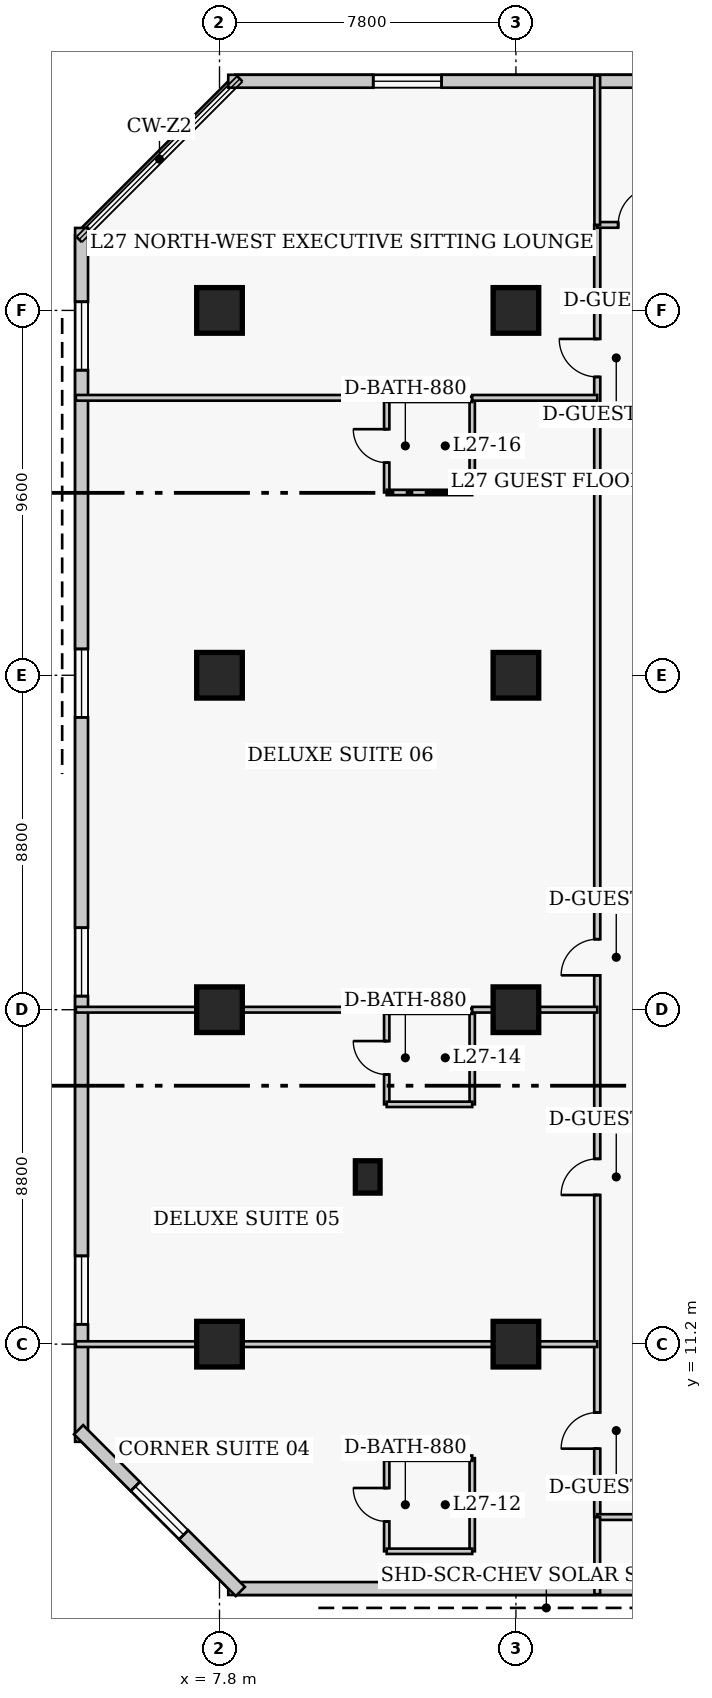
"""IFC4 building model, lengths in metres.
Left out: names, types, materials, properties, quantities, classifications, styles, units other than length and angle.
Written with IfcOpenShell. Run it as: python <this file> out.ifc"""

import sys

from ifc_helpers import new_model, si_unit, direction, frame, frame_2d, origin, origin_2d, place, context, subcontext, project, spatial, rectangle, extrude, element, fill, save


model = new_model("IFC4")
c1 = context("Model", 3, precision=1e-05, world=origin(), true_north=direction((0.0, 1.0)))
c2 = subcontext(c1, "Body", "Model", "MODEL_VIEW")
j1 = project(units=[si_unit("LENGTHUNIT", "METRE"), si_unit("PLANEANGLEUNIT", "RADIAN")], contexts=[c1])
p1 = place(None, origin())
s1 = spatial("IfcSite", under=j1, at=p1, CompositionType="ELEMENT")
p2 = place(p1, origin())
s2 = spatial("IfcBuilding", under=s1, at=p2, CompositionType="ELEMENT")
p3 = place(p2, frame((0.0, 0.0, 110.8)))
s3 = spatial("IfcBuildingStorey", under=s2, at=p3, CompositionType="ELEMENT", Elevation=110.8)
for number, where, z_axis, x_axis in (
    (1, (7.8, 11.2, 0.0), (0.0, 0.0, 1.0), (1.0, 0.0, 0.0)),
    (2, (7.8, 20.0, 0.0), (0.0, 0.0, 1.0), (1.0, 0.0, 0.0)),
    (3, (7.8, 28.8, 0.0), (0.0, 0.0, 1.0), (1.0, 0.0, 0.0)),
    (4, (7.8, 38.4, 0.0), (0.0, 0.0, 1.0), (1.0, 0.0, 0.0)),
    (5, (15.6, 11.2, 0.0), (0.0, 0.0, 1.0), (1.0, 0.0, 0.0)),
    (6, (15.6, 20.0, 0.0), (0.0, 0.0, 1.0), (1.0, 0.0, 0.0)),
    (7, (15.6, 28.8, 0.0), (0.0, 0.0, 1.0), (1.0, 0.0, 0.0)),
    (8, (15.6, 38.4, 0.0), (0.0, 0.0, 1.0), (1.0, 0.0, 0.0)),
):
    element("IfcColumn", number, at=place(p3, frame(where, z_axis=z_axis, x_axis=x_axis)), inside=s3, PredefinedType="COLUMN", context=c2, shape_type="SweptSolid", body=[
        extrude(rectangle(XDim=1.2, YDim=1.2, at=origin_2d()), origin(), (0.0, 0.0, 1.0), 3.8),
    ])
p4 = place(p3, frame((11.7, 15.6, 0.0), z_axis=(0.0, 0.0, 1.0), x_axis=(1.0, 0.0, 0.0)))
e9 = element("IfcColumn", 9, at=p4, inside=s3, PredefinedType="PILASTER", context=c2, shape_type="SweptSolid", body=[
    extrude(rectangle(XDim=0.65, YDim=0.85, at=origin_2d()), origin(), (0.0, 0.0, 1.0), 3.8),
])
p5 = place(p3, frame((8.03, 4.77, 0.0), z_axis=(0.0, 0.0, 1.0), x_axis=(1.0, 0.0, 0.0)))
e10 = element("IfcWall", 10, at=p5, inside=s3, PredefinedType="SOLIDWALL", context=c2, shape_type="SweptSolid", body=[
    extrude(rectangle(XDim=28.29, YDim=0.34, at=frame_2d((14.145, 0.0))), origin(), (0.0, 0.0, 1.0), 3.54),
])
p6 = place(p5, frame((12.595, 0.0, 0.85)))
e11 = element("IfcOpeningElement", 11, at=p6, cuts=e10, PredefinedType="OPENING", context=c2, shape_type="SweptSolid", body=[
    extrude(rectangle(XDim=1.8, YDim=1.8, at=frame_2d((0.9, 0.9))), frame((0.0, 0.18, 0.0), z_axis=(0.0, -1.0, 0.0), x_axis=(1.0, 0.0, 0.0)), (0.0, 0.0, 1.0), 0.36),
])
p7 = place(p3, frame((36.32, 44.43, 0.0), z_axis=(0.0, 0.0, 1.0), x_axis=(-1.0, 0.0, 0.0)))
e12 = element("IfcWall", 12, at=p7, inside=s3, PredefinedType="SOLIDWALL", context=c2, shape_type="SweptSolid", body=[
    extrude(rectangle(XDim=28.29, YDim=0.34, at=frame_2d((14.145, 0.0))), origin(), (0.0, 0.0, 1.0), 3.54),
])
p8 = place(p7, frame((3.815, 0.0, 0.85)))
e13 = element("IfcOpeningElement", 13, at=p8, cuts=e12, PredefinedType="OPENING", context=c2, shape_type="SweptSolid", body=[
    extrude(rectangle(XDim=1.8, YDim=1.8, at=frame_2d((0.9, 0.9))), frame((0.0, 0.18, 0.0), z_axis=(0.0, -1.0, 0.0), x_axis=(1.0, 0.0, 0.0)), (0.0, 0.0, 1.0), 0.36),
])
p9 = place(p7, frame((13.245, 0.0, 0.85)))
e14 = element("IfcOpeningElement", 14, at=p9, cuts=e12, PredefinedType="OPENING", context=c2, shape_type="SweptSolid", body=[
    extrude(rectangle(XDim=1.8, YDim=1.8, at=frame_2d((0.9, 0.9))), frame((0.0, 0.18, 0.0), z_axis=(0.0, -1.0, 0.0), x_axis=(1.0, 0.0, 0.0)), (0.0, 0.0, 1.0), 0.36),
])
p10 = place(p7, frame((22.675, 0.0, 0.85)))
e15 = element("IfcOpeningElement", 15, at=p10, cuts=e12, PredefinedType="OPENING", context=c2, shape_type="SweptSolid", body=[
    extrude(rectangle(XDim=1.8, YDim=1.8, at=frame_2d((0.9, 0.9))), frame((0.0, 0.18, 0.0), z_axis=(0.0, -1.0, 0.0), x_axis=(1.0, 0.0, 0.0)), (0.0, 0.0, 1.0), 0.36),
])
p11 = place(p3, frame((4.17, 40.57, 0.0), z_axis=(0.0, 0.0, 1.0), x_axis=(0.0, -1.0, 0.0)))
e16 = element("IfcWall", 16, at=p11, inside=s3, PredefinedType="SOLIDWALL", context=c2, shape_type="SweptSolid", body=[
    extrude(rectangle(XDim=31.94, YDim=0.34, at=frame_2d((15.97, 0.0))), origin(), (0.0, 0.0, 1.0), 3.54),
])
p12 = place(p11, frame((1.942, 0.0, 0.85)))
e17 = element("IfcOpeningElement", 17, at=p12, cuts=e16, PredefinedType="OPENING", context=c2, shape_type="SweptSolid", body=[
    extrude(rectangle(XDim=1.8, YDim=1.8, at=frame_2d((0.9, 0.9))), frame((0.0, 0.18, 0.0), z_axis=(0.0, -1.0, 0.0), x_axis=(1.0, 0.0, 0.0)), (0.0, 0.0, 1.0), 0.36),
])
p13 = place(p11, frame((11.077, 0.0, 0.85)))
e18 = element("IfcOpeningElement", 18, at=p13, cuts=e16, PredefinedType="OPENING", context=c2, shape_type="SweptSolid", body=[
    extrude(rectangle(XDim=1.8, YDim=1.8, at=frame_2d((0.9, 0.9))), frame((0.0, 0.18, 0.0), z_axis=(0.0, -1.0, 0.0), x_axis=(1.0, 0.0, 0.0)), (0.0, 0.0, 1.0), 0.36),
])
p14 = place(p11, frame((18.413, 0.0, 0.85)))
e19 = element("IfcOpeningElement", 19, at=p14, cuts=e16, PredefinedType="OPENING", context=c2, shape_type="SweptSolid", body=[
    extrude(rectangle(XDim=1.8, YDim=1.8, at=frame_2d((0.9, 0.9))), frame((0.0, 0.18, 0.0), z_axis=(0.0, -1.0, 0.0), x_axis=(1.0, 0.0, 0.0)), (0.0, 0.0, 1.0), 0.36),
])
p15 = place(p11, frame((27.048, 0.0, 0.85)))
e20 = element("IfcOpeningElement", 20, at=p15, cuts=e16, PredefinedType="OPENING", context=c2, shape_type="SweptSolid", body=[
    extrude(rectangle(XDim=1.8, YDim=1.8, at=frame_2d((0.9, 0.9))), frame((0.0, 0.18, 0.0), z_axis=(0.0, -1.0, 0.0), x_axis=(1.0, 0.0, 0.0)), (0.0, 0.0, 1.0), 0.36),
])
p16 = place(p3, frame((4.092, 8.948, 0.0), z_axis=(0.0, 0.0, 1.0), x_axis=(0.707106781187, -0.707106781187, 0.0)))
e21 = element("IfcWall", 21, at=p16, inside=s3, PredefinedType="SOLIDWALL", context=c2, shape_type="SweptSolid", body=[
    extrude(rectangle(XDim=6.02, YDim=0.34, at=frame_2d((3.01, 0.0))), origin(), (0.0, 0.0, 1.0), 3.54),
])
p17 = place(p16, frame((2.11, 0.0, 0.85)))
e22 = element("IfcOpeningElement", 22, at=p17, cuts=e21, PredefinedType="OPENING", context=c2, shape_type="SweptSolid", body=[
    extrude(rectangle(XDim=1.8, YDim=1.8, at=frame_2d((0.9, 0.9))), frame((0.0, 0.18, 0.0), z_axis=(0.0, -1.0, 0.0), x_axis=(1.0, 0.0, 0.0)), (0.0, 0.0, 1.0), 0.36),
])
p18 = place(p3, frame((17.74, 6.65, 0.0), z_axis=(0.0, 0.0, 1.0), x_axis=(0.0, 1.0, 0.0)))
e23 = element("IfcWall", 23, at=p18, inside=s3, PredefinedType="PARTITIONING", context=c2, shape_type="SweptSolid", body=[
    extrude(rectangle(XDim=34.0, YDim=0.16, at=frame_2d((17.0, 0.0))), origin(), (0.0, 0.0, 1.0), 3.54),
])
p19 = place(p18, frame((1.8, 0.0, 0.0)))
e24 = element("IfcOpeningElement", 24, at=p19, cuts=e23, PredefinedType="OPENING", context=c2, shape_type="SweptSolid", body=[
    extrude(rectangle(XDim=0.95, YDim=2.1, at=frame_2d((0.475, 1.05))), frame((0.0, 0.09, 0.0), z_axis=(0.0, -1.0, 0.0), x_axis=(1.0, 0.0, 0.0)), (0.0, 0.0, 1.0), 0.18),
])
p20 = place(p18, frame((8.475, 0.0, 0.0)))
e25 = element("IfcOpeningElement", 25, at=p20, cuts=e23, PredefinedType="OPENING", context=c2, shape_type="SweptSolid", body=[
    extrude(rectangle(XDim=0.95, YDim=2.1, at=frame_2d((0.475, 1.05))), frame((0.0, 0.09, 0.0), z_axis=(0.0, -1.0, 0.0), x_axis=(1.0, 0.0, 0.0)), (0.0, 0.0, 1.0), 0.18),
])
p21 = place(p18, frame((14.255, 0.0, 0.0)))
e26 = element("IfcOpeningElement", 26, at=p21, cuts=e23, PredefinedType="OPENING", context=c2, shape_type="SweptSolid", body=[
    extrude(rectangle(XDim=0.95, YDim=2.1, at=frame_2d((0.475, 1.05))), frame((0.0, 0.09, 0.0), z_axis=(0.0, -1.0, 0.0), x_axis=(1.0, 0.0, 0.0)), (0.0, 0.0, 1.0), 0.18),
])
p22 = place(p18, frame((30.0, 0.0, 0.0)))
e27 = element("IfcOpeningElement", 27, at=p22, cuts=e23, PredefinedType="OPENING", context=c2, shape_type="SweptSolid", body=[
    extrude(rectangle(XDim=1.0, YDim=2.15, at=frame_2d((0.5, 1.075))), frame((0.0, 0.09, 0.0), z_axis=(0.0, -1.0, 0.0), x_axis=(1.0, 0.0, 0.0)), (0.0, 0.0, 1.0), 0.18),
])
p23 = place(p3, frame((17.74, 6.65, 0.0), z_axis=(0.0, 0.0, 1.0), x_axis=(1.0, 0.0, 0.0)))
e28 = element("IfcWall", 28, at=p23, inside=s3, PredefinedType="PARTITIONING", context=c2, shape_type="SweptSolid", body=[
    extrude(rectangle(XDim=2.22, YDim=0.15, at=frame_2d((1.11, 0.0))), origin(), (0.0, 0.0, 1.0), 3.54),
])
p24 = place(p3, frame((17.74, 40.65, 0.0), z_axis=(0.0, 0.0, 1.0), x_axis=(1.0, 0.0, 0.0)))
e29 = element("IfcWall", 29, at=p24, inside=s3, PredefinedType="PARTITIONING", context=c2, shape_type="SweptSolid", body=[
    extrude(rectangle(XDim=4.36, YDim=0.15, at=frame_2d((2.18, 0.0))), origin(), (0.0, 0.0, 1.0), 3.54),
])
p25 = place(p24, frame((0.55, 0.0, 0.0)))
e30 = element("IfcOpeningElement", 30, at=p25, cuts=e29, PredefinedType="OPENING", context=c2, shape_type="SweptSolid", body=[
    extrude(rectangle(XDim=1.0, YDim=2.15, at=frame_2d((0.5, 1.075))), frame((0.0, 0.085, 0.0), z_axis=(0.0, -1.0, 0.0), x_axis=(1.0, 0.0, 0.0)), (0.0, 0.0, 1.0), 0.17),
])
p26 = place(p3, frame((17.74, 40.65, 0.0), z_axis=(0.0, 0.0, 1.0), x_axis=(0.0, 1.0, 0.0)))
e31 = element("IfcWall", 31, at=p26, inside=s3, PredefinedType="PARTITIONING", context=c2, shape_type="SweptSolid", body=[
    extrude(rectangle(XDim=3.93, YDim=0.15, at=frame_2d((1.965, 0.0))), origin(), (0.0, 0.0, 1.0), 3.54),
])
p27 = place(p3, frame((17.74, 4.62, 0.0), z_axis=(0.0, 0.0, 1.0), x_axis=(0.0, 1.0, 0.0)))
e32 = element("IfcWall", 32, at=p27, inside=s3, PredefinedType="PARTITIONING", context=c2, shape_type="SweptSolid", body=[
    extrude(rectangle(XDim=2.03, YDim=0.15, at=frame_2d((1.015, 0.0))), origin(), (0.0, 0.0, 1.0), 3.54),
])
p28 = place(p3, frame((12.2, 5.75, 0.0), z_axis=(0.0, 0.0, 1.0), x_axis=(0.0, 1.0, 0.0)))
e33 = element("IfcWall", 33, at=p28, inside=s3, PredefinedType="PLUMBINGWALL", context=c2, shape_type="SweptSolid", body=[
    extrude(rectangle(XDim=2.45, YDim=0.14, at=frame_2d((1.225, 0.0))), origin(), (0.0, 0.0, 1.0), 3.54),
])
p29 = place(p28, frame((0.785, 0.0, 0.0)))
e34 = element("IfcOpeningElement", 34, at=p29, cuts=e33, PredefinedType="OPENING", context=c2, shape_type="SweptSolid", body=[
    extrude(rectangle(XDim=0.88, YDim=2.05, at=frame_2d((0.44, 1.025))), frame((0.0, 0.08, 0.0), z_axis=(0.0, -1.0, 0.0), x_axis=(1.0, 0.0, 0.0)), (0.0, 0.0, 1.0), 0.16),
])
p30 = place(p3, frame((14.45, 5.75, 0.0), z_axis=(0.0, 0.0, 1.0), x_axis=(0.0, 1.0, 0.0)))
e35 = element("IfcWall", 35, at=p30, inside=s3, PredefinedType="PLUMBINGWALL", context=c2, shape_type="SweptSolid", body=[
    extrude(rectangle(XDim=2.45, YDim=0.14, at=frame_2d((1.225, 0.0))), origin(), (0.0, 0.0, 1.0), 3.54),
])
for number, where, z_axis, x_axis in (
    (36, (12.2, 5.75, 0.0), (0.0, 0.0, 1.0), (1.0, 0.0, 0.0)),
    (37, (12.2, 8.2, 0.0), (0.0, 0.0, 1.0), (1.0, 0.0, 0.0)),
):
    element("IfcWall", number, at=place(p3, frame(where, z_axis=z_axis, x_axis=x_axis)), inside=s3, PredefinedType="PLUMBINGWALL", context=c2, shape_type="SweptSolid", body=[
        extrude(rectangle(XDim=2.25, YDim=0.14, at=frame_2d((1.125, 0.0))), origin(), (0.0, 0.0, 1.0), 3.54),
    ])
p31 = place(p3, frame((4.02, 11.2, 0.0), z_axis=(0.0, 0.0, 1.0), x_axis=(1.0, 0.0, 0.0)))
e38 = element("IfcWall", 38, at=p31, inside=s3, PredefinedType="PARTITIONING", context=c2, shape_type="SweptSolid", body=[
    extrude(rectangle(XDim=13.72, YDim=0.15, at=frame_2d((6.86, 0.0))), origin(), (0.0, 0.0, 1.0), 2.679),
])
p32 = place(p3, frame((12.2, 17.51, 0.0), z_axis=(0.0, 0.0, 1.0), x_axis=(0.0, 1.0, 0.0)))
e39 = element("IfcWall", 39, at=p32, inside=s3, PredefinedType="PLUMBINGWALL", context=c2, shape_type="SweptSolid", body=[
    extrude(rectangle(XDim=2.45, YDim=0.14, at=frame_2d((1.225, 0.0))), origin(), (0.0, 0.0, 1.0), 3.54),
])
p33 = place(p32, frame((0.785, 0.0, 0.0)))
e40 = element("IfcOpeningElement", 40, at=p33, cuts=e39, PredefinedType="OPENING", context=c2, shape_type="SweptSolid", body=[
    extrude(rectangle(XDim=0.88, YDim=2.05, at=frame_2d((0.44, 1.025))), frame((0.0, 0.08, 0.0), z_axis=(0.0, -1.0, 0.0), x_axis=(1.0, 0.0, 0.0)), (0.0, 0.0, 1.0), 0.16),
])
p34 = place(p3, frame((14.45, 17.51, 0.0), z_axis=(0.0, 0.0, 1.0), x_axis=(0.0, 1.0, 0.0)))
e41 = element("IfcWall", 41, at=p34, inside=s3, PredefinedType="PLUMBINGWALL", context=c2, shape_type="SweptSolid", body=[
    extrude(rectangle(XDim=2.45, YDim=0.14, at=frame_2d((1.225, 0.0))), origin(), (0.0, 0.0, 1.0), 3.54),
])
p35 = place(p3, frame((12.2, 17.51, 0.0), z_axis=(0.0, 0.0, 1.0), x_axis=(1.0, 0.0, 0.0)))
e42 = element("IfcWall", 42, at=p35, inside=s3, PredefinedType="PLUMBINGWALL", context=c2, shape_type="SweptSolid", body=[
    extrude(rectangle(XDim=2.25, YDim=0.14, at=frame_2d((1.125, 0.0))), origin(), (0.0, 0.0, 1.0), 3.54),
])
p36 = place(p3, frame((12.2, 19.96, 0.0), z_axis=(0.0, 0.0, 1.0), x_axis=(1.0, 0.0, 0.0)))
e43 = element("IfcWall", 43, at=p36, inside=s3, PredefinedType="PLUMBINGWALL", context=c2, shape_type="SweptSolid", body=[
    extrude(rectangle(XDim=2.25, YDim=0.14, at=frame_2d((1.125, 0.0))), origin(), (0.0, 0.0, 1.0), 2.679),
])
p37 = place(p3, frame((4.02, 20.0, 0.0), z_axis=(0.0, 0.0, 1.0), x_axis=(1.0, 0.0, 0.0)))
e44 = element("IfcWall", 44, at=p37, inside=s3, PredefinedType="PARTITIONING", context=c2, shape_type="SweptSolid", body=[
    extrude(rectangle(XDim=8.18, YDim=0.15, at=frame_2d((4.09, 0.0))), origin(), (0.0, 0.0, 1.0), 2.679),
])
p38 = place(p3, frame((14.45, 20.0, 0.0), z_axis=(0.0, 0.0, 1.0), x_axis=(1.0, 0.0, 0.0)))
e45 = element("IfcWall", 45, at=p38, inside=s3, PredefinedType="PARTITIONING", context=c2, shape_type="SweptSolid", body=[
    extrude(rectangle(XDim=3.29, YDim=0.15, at=frame_2d((1.645, 0.0))), origin(), (0.0, 0.0, 1.0), 2.679),
])
p39 = place(p3, frame((12.2, 33.61, 0.0), z_axis=(0.0, 0.0, 1.0), x_axis=(0.0, 1.0, 0.0)))
e46 = element("IfcWall", 46, at=p39, inside=s3, PredefinedType="PLUMBINGWALL", context=c2, shape_type="SweptSolid", body=[
    extrude(rectangle(XDim=2.45, YDim=0.14, at=frame_2d((1.225, 0.0))), origin(), (0.0, 0.0, 1.0), 3.54),
])
p40 = place(p39, frame((0.785, 0.0, 0.0)))
e47 = element("IfcOpeningElement", 47, at=p40, cuts=e46, PredefinedType="OPENING", context=c2, shape_type="SweptSolid", body=[
    extrude(rectangle(XDim=0.88, YDim=2.05, at=frame_2d((0.44, 1.025))), frame((0.0, 0.08, 0.0), z_axis=(0.0, -1.0, 0.0), x_axis=(1.0, 0.0, 0.0)), (0.0, 0.0, 1.0), 0.16),
])
p41 = place(p3, frame((14.45, 33.61, 0.0), z_axis=(0.0, 0.0, 1.0), x_axis=(0.0, 1.0, 0.0)))
e48 = element("IfcWall", 48, at=p41, inside=s3, PredefinedType="PLUMBINGWALL", context=c2, shape_type="SweptSolid", body=[
    extrude(rectangle(XDim=2.45, YDim=0.14, at=frame_2d((1.225, 0.0))), origin(), (0.0, 0.0, 1.0), 3.54),
])
for number, where, z_axis, x_axis in (
    (49, (12.2, 33.61, 0.0), (0.0, 0.0, 1.0), (1.0, 0.0, 0.0)),
    (50, (12.2, 36.06, 0.0), (0.0, 0.0, 1.0), (1.0, 0.0, 0.0)),
):
    element("IfcWall", number, at=place(p3, frame(where, z_axis=z_axis, x_axis=x_axis)), inside=s3, PredefinedType="PLUMBINGWALL", context=c2, shape_type="SweptSolid", body=[
        extrude(rectangle(XDim=2.25, YDim=0.14, at=frame_2d((1.125, 0.0))), origin(), (0.0, 0.0, 1.0), 3.54),
    ])
p42 = place(p3, frame((4.02, 36.1, 0.0), z_axis=(0.0, 0.0, 1.0), x_axis=(1.0, 0.0, 0.0)))
e51 = element("IfcWall", 51, at=p42, inside=s3, PredefinedType="PARTITIONING", context=c2, shape_type="SweptSolid", body=[
    extrude(rectangle(XDim=8.18, YDim=0.15, at=frame_2d((4.09, 0.0))), origin(), (0.0, 0.0, 1.0), 3.54),
])
p43 = place(p3, frame((14.45, 36.1, 0.0), z_axis=(0.0, 0.0, 1.0), x_axis=(1.0, 0.0, 0.0)))
e52 = element("IfcWall", 52, at=p43, inside=s3, PredefinedType="PARTITIONING", context=c2, shape_type="SweptSolid", body=[
    extrude(rectangle(XDim=3.29, YDim=0.15, at=frame_2d((1.645, 0.0))), origin(), (0.0, 0.0, 1.0), 3.54),
])
p44 = place(p10, origin())
e53 = element("IfcWindow", 53, at=p44, inside=s3, PartitioningType="SINGLE_PANEL", PredefinedType="WINDOW", context=c2, shape_type="SweptSolid", body=[
    extrude(rectangle(XDim=1.8, YDim=1.8, at=frame_2d((0.9, 0.9))), frame((0.0, 0.03, 0.0), z_axis=(0.0, -1.0, 0.0), x_axis=(1.0, 0.0, 0.0)), (0.0, 0.0, 1.0), 0.06),
])
fill(e15, e53)
p45 = place(p12, origin())
e54 = element("IfcWindow", 54, at=p45, inside=s3, PartitioningType="SINGLE_PANEL", PredefinedType="WINDOW", context=c2, shape_type="SweptSolid", body=[
    extrude(rectangle(XDim=1.8, YDim=1.8, at=frame_2d((0.9, 0.9))), frame((0.0, 0.03, 0.0), z_axis=(0.0, -1.0, 0.0), x_axis=(1.0, 0.0, 0.0)), (0.0, 0.0, 1.0), 0.06),
])
fill(e17, e54)
p46 = place(p13, origin())
e55 = element("IfcWindow", 55, at=p46, inside=s3, PartitioningType="SINGLE_PANEL", PredefinedType="WINDOW", context=c2, shape_type="SweptSolid", body=[
    extrude(rectangle(XDim=1.8, YDim=1.8, at=frame_2d((0.9, 0.9))), frame((0.0, 0.03, 0.0), z_axis=(0.0, -1.0, 0.0), x_axis=(1.0, 0.0, 0.0)), (0.0, 0.0, 1.0), 0.06),
])
fill(e18, e55)
p47 = place(p14, origin())
e56 = element("IfcWindow", 56, at=p47, inside=s3, PartitioningType="SINGLE_PANEL", PredefinedType="WINDOW", context=c2, shape_type="SweptSolid", body=[
    extrude(rectangle(XDim=1.8, YDim=1.8, at=frame_2d((0.9, 0.9))), frame((0.0, 0.03, 0.0), z_axis=(0.0, -1.0, 0.0), x_axis=(1.0, 0.0, 0.0)), (0.0, 0.0, 1.0), 0.06),
])
fill(e19, e56)
p48 = place(p15, origin())
e57 = element("IfcWindow", 57, at=p48, inside=s3, PartitioningType="SINGLE_PANEL", PredefinedType="WINDOW", context=c2, shape_type="SweptSolid", body=[
    extrude(rectangle(XDim=1.8, YDim=1.8, at=frame_2d((0.9, 0.9))), frame((0.0, 0.03, 0.0), z_axis=(0.0, -1.0, 0.0), x_axis=(1.0, 0.0, 0.0)), (0.0, 0.0, 1.0), 0.06),
])
fill(e20, e57)
p49 = place(p17, origin())
e58 = element("IfcWindow", 58, at=p49, inside=s3, PartitioningType="SINGLE_PANEL", PredefinedType="WINDOW", context=c2, shape_type="SweptSolid", body=[
    extrude(rectangle(XDim=1.8, YDim=1.8, at=frame_2d((0.9, 0.9))), frame((0.0, 0.03, 0.0), z_axis=(0.0, -1.0, 0.0), x_axis=(1.0, 0.0, 0.0)), (0.0, 0.0, 1.0), 0.06),
])
fill(e22, e58)
p50 = place(p25, origin())
e59 = element("IfcDoor", 59, at=p50, inside=s3, OperationType="SINGLE_SWING_RIGHT", PredefinedType="DOOR", context=c2, shape_type="SweptSolid", body=[
    extrude(rectangle(XDim=1.0, YDim=2.15, at=frame_2d((0.5, 1.075))), frame((0.0, 0.025, 0.0), z_axis=(0.0, -1.0, 0.0), x_axis=(1.0, 0.0, 0.0)), (0.0, 0.0, 1.0), 0.05),
])
fill(e30, e59)
p51 = place(p29, origin())
e60 = element("IfcDoor", 60, at=p51, inside=s3, OperationType="SINGLE_SWING_RIGHT", PredefinedType="DOOR", context=c2, shape_type="SweptSolid", body=[
    extrude(rectangle(XDim=0.88, YDim=2.05, at=frame_2d((0.44, 1.025))), frame((0.0, 0.025, 0.0), z_axis=(0.0, -1.0, 0.0), x_axis=(1.0, 0.0, 0.0)), (0.0, 0.0, 1.0), 0.05),
])
fill(e34, e60)
p52 = place(p19, origin())
e61 = element("IfcDoor", 61, at=p52, inside=s3, OperationType="SINGLE_SWING_LEFT", PredefinedType="DOOR", context=c2, shape_type="SweptSolid", body=[
    extrude(rectangle(XDim=0.95, YDim=2.1, at=frame_2d((0.475, 1.05))), frame((0.0, 0.025, 0.0), z_axis=(0.0, -1.0, 0.0), x_axis=(1.0, 0.0, 0.0)), (0.0, 0.0, 1.0), 0.05),
])
fill(e24, e61)
p53 = place(p33, origin())
e62 = element("IfcDoor", 62, at=p53, inside=s3, OperationType="SINGLE_SWING_RIGHT", PredefinedType="DOOR", context=c2, shape_type="SweptSolid", body=[
    extrude(rectangle(XDim=0.88, YDim=2.05, at=frame_2d((0.44, 1.025))), frame((0.0, 0.025, 0.0), z_axis=(0.0, -1.0, 0.0), x_axis=(1.0, 0.0, 0.0)), (0.0, 0.0, 1.0), 0.05),
])
fill(e40, e62)
p54 = place(p20, origin())
e63 = element("IfcDoor", 63, at=p54, inside=s3, OperationType="SINGLE_SWING_LEFT", PredefinedType="DOOR", context=c2, shape_type="SweptSolid", body=[
    extrude(rectangle(XDim=0.95, YDim=2.1, at=frame_2d((0.475, 1.05))), frame((0.0, 0.025, 0.0), z_axis=(0.0, -1.0, 0.0), x_axis=(1.0, 0.0, 0.0)), (0.0, 0.0, 1.0), 0.05),
])
fill(e25, e63)
p55 = place(p40, origin())
e64 = element("IfcDoor", 64, at=p55, inside=s3, OperationType="SINGLE_SWING_RIGHT", PredefinedType="DOOR", context=c2, shape_type="SweptSolid", body=[
    extrude(rectangle(XDim=0.88, YDim=2.05, at=frame_2d((0.44, 1.025))), frame((0.0, 0.025, 0.0), z_axis=(0.0, -1.0, 0.0), x_axis=(1.0, 0.0, 0.0)), (0.0, 0.0, 1.0), 0.05),
])
fill(e47, e64)
p56 = place(p21, origin())
e65 = element("IfcDoor", 65, at=p56, inside=s3, OperationType="SINGLE_SWING_LEFT", PredefinedType="DOOR", context=c2, shape_type="SweptSolid", body=[
    extrude(rectangle(XDim=0.95, YDim=2.1, at=frame_2d((0.475, 1.05))), frame((0.0, 0.025, 0.0), z_axis=(0.0, -1.0, 0.0), x_axis=(1.0, 0.0, 0.0)), (0.0, 0.0, 1.0), 0.05),
])
fill(e26, e65)
p57 = place(p22, origin())
e66 = element("IfcDoor", 66, at=p57, inside=s3, OperationType="SINGLE_SWING_RIGHT", PredefinedType="DOOR", context=c2, shape_type="SweptSolid", body=[
    extrude(rectangle(XDim=1.0, YDim=2.15, at=frame_2d((0.5, 1.075))), frame((0.0, 0.025, 0.0), z_axis=(0.0, -1.0, 0.0), x_axis=(1.0, 0.0, 0.0)), (0.0, 0.0, 1.0), 0.05),
])
fill(e27, e66)
save(model, sys.argv[1])
